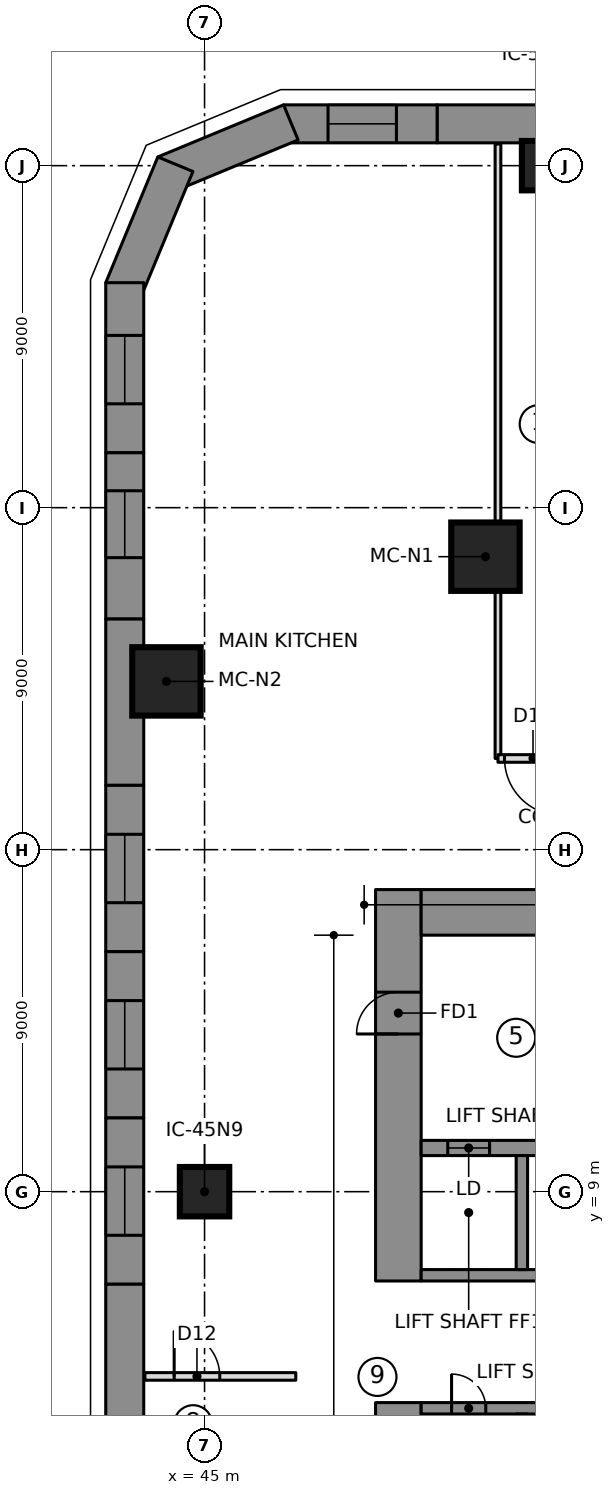
"""IFC4 building model, lengths in metres.
Left out: names, types, materials, properties, quantities, classifications, styles, units other than length and angle.
Written with IfcOpenShell. Run it as: python <this file> out.ifc"""

import sys

from ifc_helpers import new_model, si_unit, direction, frame, frame_2d, origin, origin_2d, place, context, subcontext, project, spatial, polyline, rectangle, outline, extrude, element, fill, save


model = new_model("IFC4")
c1 = context("Model", 3, precision=1e-05, world=origin(), true_north=direction((0.0, 1.0)))
c2 = subcontext(c1, "Body", "Model", "MODEL_VIEW")
j1 = project(units=[si_unit("LENGTHUNIT", "METRE"), si_unit("PLANEANGLEUNIT", "RADIAN")], contexts=[c1])
p1 = place(None, origin())
s1 = spatial("IfcSite", under=j1, at=p1, CompositionType="ELEMENT")
p2 = place(p1, origin())
s2 = spatial("IfcBuilding", under=s1, at=p2, CompositionType="ELEMENT")
p3 = place(p2, frame((0.0, 0.0, 13.5)))
s3 = spatial("IfcBuildingStorey", under=s2, at=p3, CompositionType="ELEMENT", Elevation=13.5)
p4 = place(p3, frame((50.1, 6.65, 0.0), z_axis=(0.0, 0.0, 1.0), x_axis=(0.0, 1.0, 0.0)))
e1 = element("IfcWall", 1, at=p4, inside=s3, PredefinedType="SHEAR", context=c2, shape_type="SweptSolid", body=[
    extrude(rectangle(XDim=10.3, YDim=1.2, at=frame_2d((5.15, 0.0))), origin(), (0.0, 0.0, 1.0), 5.5),
])
p5 = place(p4, frame((6.5, 0.0, 0.0)))
e2 = element("IfcOpeningElement", 2, at=p5, cuts=e1, PredefinedType="OPENING", context=c2, shape_type="SweptSolid", body=[
    extrude(rectangle(XDim=1.1, YDim=2.1, at=frame_2d((0.55, 1.05))), frame((0.0, 0.61, 0.0), z_axis=(0.0, -1.0, 0.0), x_axis=(1.0, 0.0, 0.0)), (0.0, 0.0, 1.0), 1.22),
])
p6 = place(p3, frame((50.1, -3.45, 0.0), z_axis=(0.0, 0.0, 1.0), x_axis=(0.0, 1.0, 0.0)))
e3 = element("IfcWall", 3, at=p6, inside=s3, PredefinedType="SHEAR", context=c2, shape_type="SweptSolid", body=[
    extrude(rectangle(XDim=6.9, YDim=1.2, at=frame_2d((3.45, 0.0))), origin(), (0.0, 0.0, 1.0), 5.5),
])
p7 = place(p3, frame((50.7, 16.35, 0.0), z_axis=(0.0, 0.0, 1.0), x_axis=(1.0, 0.0, 0.0)))
e4 = element("IfcWall", 4, at=p7, inside=s3, PredefinedType="SHEAR", context=c2, shape_type="SweptSolid", body=[
    extrude(rectangle(XDim=13.38, YDim=1.2, at=frame_2d((6.69, 0.0))), origin(), (0.0, 0.0, 1.0), 5.5),
])
p8 = place(p3, frame((50.7, 10.15, 0.0), z_axis=(0.0, 0.0, 1.0), x_axis=(1.0, 0.0, 0.0)))
e5 = element("IfcWall", 5, at=p8, inside=s3, PredefinedType="SHEAR", context=c2, shape_type="SweptSolid", body=[
    extrude(rectangle(XDim=12.18, YDim=0.4, at=frame_2d((6.09, 0.0))), origin(), (0.0, 0.0, 1.0), 5.5),
])
p9 = place(p8, frame((0.7, 0.0, 0.0)))
e6 = element("IfcOpeningElement", 6, at=p9, cuts=e5, PredefinedType="OPENING", context=c2, shape_type="SweptSolid", body=[
    extrude(rectangle(XDim=1.1, YDim=2.1, at=frame_2d((0.55, 1.05))), frame((0.0, 0.21, 0.0), z_axis=(0.0, -1.0, 0.0), x_axis=(1.0, 0.0, 0.0)), (0.0, 0.0, 1.0), 0.42),
])
p10 = place(p8, frame((3.5, 0.0, 0.0)))
e7 = element("IfcOpeningElement", 7, at=p10, cuts=e5, PredefinedType="OPENING", context=c2, shape_type="SweptSolid", body=[
    extrude(rectangle(XDim=1.1, YDim=2.1, at=frame_2d((0.55, 1.05))), frame((0.0, 0.21, 0.0), z_axis=(0.0, -1.0, 0.0), x_axis=(1.0, 0.0, 0.0)), (0.0, 0.0, 1.0), 0.42),
])
p11 = place(p3, frame((50.7, 3.3, 0.0), z_axis=(0.0, 0.0, 1.0), x_axis=(1.0, 0.0, 0.0)))
e8 = element("IfcWall", 8, at=p11, inside=s3, PredefinedType="SHEAR", context=c2, shape_type="SweptSolid", body=[
    extrude(rectangle(XDim=10.9, YDim=0.3, at=frame_2d((5.45, 0.0))), origin(), (0.0, 0.0, 1.0), 5.5),
])
p12 = place(p11, frame((0.8, 0.0, 0.0)))
e9 = element("IfcOpeningElement", 9, at=p12, cuts=e8, PredefinedType="OPENING", context=c2, shape_type="SweptSolid", body=[
    extrude(rectangle(XDim=0.9, YDim=2.1, at=frame_2d((0.45, 1.05))), frame((0.0, 0.16, 0.0), z_axis=(0.0, -1.0, 0.0), x_axis=(1.0, 0.0, 0.0)), (0.0, 0.0, 1.0), 0.32),
])
p13 = place(p11, frame((3.6, 0.0, 0.0)))
e10 = element("IfcOpeningElement", 10, at=p13, cuts=e8, PredefinedType="OPENING", context=c2, shape_type="SweptSolid", body=[
    extrude(rectangle(XDim=0.9, YDim=2.1, at=frame_2d((0.45, 1.05))), frame((0.0, 0.16, 0.0), z_axis=(0.0, -1.0, 0.0), x_axis=(1.0, 0.0, 0.0)), (0.0, 0.0, 1.0), 0.32),
])
p14 = place(p11, frame((6.4, 0.0, 0.0)))
e11 = element("IfcOpeningElement", 11, at=p14, cuts=e8, PredefinedType="OPENING", context=c2, shape_type="SweptSolid", body=[
    extrude(rectangle(XDim=0.9, YDim=2.1, at=frame_2d((0.45, 1.05))), frame((0.0, 0.16, 0.0), z_axis=(0.0, -1.0, 0.0), x_axis=(1.0, 0.0, 0.0)), (0.0, 0.0, 1.0), 0.32),
])
p15 = place(p11, frame((9.2, 0.0, 0.0)))
e12 = element("IfcOpeningElement", 12, at=p15, cuts=e8, PredefinedType="OPENING", context=c2, shape_type="SweptSolid", body=[
    extrude(rectangle(XDim=0.9, YDim=2.1, at=frame_2d((0.45, 1.05))), frame((0.0, 0.16, 0.0), z_axis=(0.0, -1.0, 0.0), x_axis=(1.0, 0.0, 0.0)), (0.0, 0.0, 1.0), 0.32),
])
p16 = place(p3, frame((50.7, 6.8, 0.0), z_axis=(0.0, 0.0, 1.0), x_axis=(1.0, 0.0, 0.0)))
e13 = element("IfcWall", 13, at=p16, inside=s3, PredefinedType="SHEAR", context=c2, shape_type="SweptSolid", body=[
    extrude(rectangle(XDim=10.9, YDim=0.3, at=frame_2d((5.45, 0.0))), origin(), (0.0, 0.0, 1.0), 5.5),
])
p17 = place(p16, frame((6.3, 0.0, 0.0)))
e14 = element("IfcOpeningElement", 14, at=p17, cuts=e13, PredefinedType="OPENING", context=c2, shape_type="SweptSolid", body=[
    extrude(rectangle(XDim=1.1, YDim=2.1, at=frame_2d((0.55, 1.05))), frame((0.0, 0.16, 0.0), z_axis=(0.0, -1.0, 0.0), x_axis=(1.0, 0.0, 0.0)), (0.0, 0.0, 1.0), 0.32),
])
p18 = place(p16, frame((9.1, 0.0, 0.0)))
e15 = element("IfcOpeningElement", 15, at=p18, cuts=e13, PredefinedType="OPENING", context=c2, shape_type="SweptSolid", body=[
    extrude(rectangle(XDim=1.1, YDim=2.1, at=frame_2d((0.55, 1.05))), frame((0.0, 0.16, 0.0), z_axis=(0.0, -1.0, 0.0), x_axis=(1.0, 0.0, 0.0)), (0.0, 0.0, 1.0), 0.32),
])
for number, where, z_axis, x_axis in (
    (16, (53.35, 0.15, 0.0), (0.0, 0.0, 1.0), (0.0, 1.0, 0.0)),
    (17, (53.35, 6.95, 0.0), (0.0, 0.0, 1.0), (0.0, 1.0, 0.0)),
):
    element("IfcWall", number, at=place(p3, frame(where, z_axis=z_axis, x_axis=x_axis)), inside=s3, PredefinedType="SHEAR", context=c2, shape_type="SweptSolid", body=[
        extrude(rectangle(XDim=3.0, YDim=0.3, at=frame_2d((1.5, 0.0))), origin(), (0.0, 0.0, 1.0), 5.5),
    ])
for number, where, z_axis, x_axis in (
    (18, (52.392, 25.71, 0.0), (0.0, 0.0, 1.0), (1.0, 0.0, 0.0)),
    (19, (43.998, 22.428, 0.0), (0.0, 0.0, 1.0), (1.0, 0.0, 0.0)),
):
    element("IfcColumn", number, at=place(p3, frame(where, z_axis=z_axis, x_axis=x_axis)), inside=s3, PredefinedType="COLUMN", context=c2, shape_type="SweptSolid", body=[
        extrude(rectangle(XDim=1.8, YDim=1.8, at=origin_2d()), origin(), (0.0, 0.0, 1.0), 5.5),
    ])
for number, where, z_axis, x_axis in (
    (20, (45.0, 9.0, 0.0), (0.0, 0.0, 1.0), (1.0, 0.0, 0.0)),
    (21, (54.0, 36.0, 0.0), (0.0, 0.0, 1.0), (1.0, 0.0, 0.0)),
):
    element("IfcColumn", number, at=place(p3, frame(where, z_axis=z_axis, x_axis=x_axis)), inside=s3, PredefinedType="COLUMN", context=c2, shape_type="SweptSolid", body=[
        extrude(rectangle(XDim=1.3, YDim=1.3, at=origin_2d()), origin(), (0.0, 0.0, 1.0), 5.5),
    ])
p19 = place(p3, frame((55.06, 37.1, 0.0), z_axis=(0.0, 0.0, 1.0), x_axis=(-1.0, 0.0, 0.0)))
e22 = element("IfcWall", 22, at=p19, inside=s3, PredefinedType="NOTDEFINED", context=c2, shape_type="SweptSolid", body=[
    extrude(outline(polyline([(0.0, -0.5), (3.94, -0.5), (3.94, 0.5), (0.0, 0.5), (0.0, -0.5)])), origin(), (0.0, 0.0, 1.0), 5.2),
])
p20 = place(p3, frame((51.119, 37.1, 0.0), z_axis=(0.0, 0.0, 1.0), x_axis=(-1.0, 0.0, 0.0)))
e23 = element("IfcWall", 23, at=p20, inside=s3, PredefinedType="NOTDEFINED", context=c2, shape_type="SweptSolid", body=[
    extrude(outline(polyline([(0.0, -0.5), (4.04, -0.5), (3.841, 0.5), (0.0, 0.5), (0.0, -0.5)])), origin(), (0.0, 0.0, 1.0), 5.2),
])
p21 = place(p20, frame((1.07, 0.0, 0.9)))
e24 = element("IfcOpeningElement", 24, at=p21, cuts=e23, PredefinedType="OPENING", context=c2, shape_type="SweptSolid", body=[
    extrude(rectangle(XDim=1.8, YDim=2.4, at=frame_2d((0.9, 1.2))), frame((0.0, 0.51, 0.0), z_axis=(0.0, -1.0, 0.0), x_axis=(1.0, 0.0, 0.0)), (0.0, 0.0, 1.0), 1.02),
])
p22 = place(p3, frame((47.179, 37.1, 0.0), z_axis=(0.0, 0.0, 1.0), x_axis=(-0.923862365102, -0.382724875529, 0.0)))
e25 = element("IfcWall", 25, at=p22, inside=s3, PredefinedType="NOTDEFINED", context=c2, shape_type="SweptSolid", body=[
    extrude(outline(polyline([(-0.1, -0.5), (3.482, -0.5), (3.068, 0.5), (0.1, 0.5), (-0.1, -0.5)])), origin(), (0.0, 0.0, 1.0), 5.2),
])
p23 = place(p3, frame((44.153, 35.847, 0.0), z_axis=(0.0, 0.0, 1.0), x_axis=(-0.382724875529, -0.923862365102, 0.0)))
e26 = element("IfcWall", 26, at=p23, inside=s3, PredefinedType="NOTDEFINED", context=c2, shape_type="SweptSolid", body=[
    extrude(outline(polyline([(-0.207, -0.5), (3.375, -0.5), (3.175, 0.5), (0.207, 0.5), (-0.207, -0.5)])), origin(), (0.0, 0.0, 1.0), 5.2),
])
p24 = place(p3, frame((42.9, 32.821, 0.0), z_axis=(0.0, 0.0, 1.0), x_axis=(0.0, -1.0, 0.0)))
e27 = element("IfcWall", 27, at=p24, inside=s3, PredefinedType="NOTDEFINED", context=c2, shape_type="SweptSolid", body=[
    extrude(outline(polyline([(-0.1, -0.5), (4.376, -0.5), (4.376, 0.5), (0.1, 0.5), (-0.1, -0.5)])), origin(), (0.0, 0.0, 1.0), 5.2),
])
p25 = place(p24, frame((1.288, 0.0, 0.9)))
e28 = element("IfcOpeningElement", 28, at=p25, cuts=e27, PredefinedType="OPENING", context=c2, shape_type="SweptSolid", body=[
    extrude(rectangle(XDim=1.8, YDim=2.4, at=frame_2d((0.9, 1.2))), frame((0.0, 0.51, 0.0), z_axis=(0.0, -1.0, 0.0), x_axis=(1.0, 0.0, 0.0)), (0.0, 0.0, 1.0), 1.02),
])
p26 = place(p3, frame((42.9, 28.445, 0.0), z_axis=(0.0, 0.0, 1.0), x_axis=(0.0, -1.0, 0.0)))
e29 = element("IfcWall", 29, at=p26, inside=s3, PredefinedType="NOTDEFINED", context=c2, shape_type="SweptSolid", body=[
    extrude(outline(polyline([(0.0, -0.5), (4.376, -0.5), (4.376, 0.5), (0.0, 0.5), (0.0, -0.5)])), origin(), (0.0, 0.0, 1.0), 5.2),
])
p27 = place(p26, frame((1.0, 0.0, 0.9)))
e30 = element("IfcOpeningElement", 30, at=p27, cuts=e29, PredefinedType="OPENING", context=c2, shape_type="SweptSolid", body=[
    extrude(rectangle(XDim=1.76, YDim=2.4, at=frame_2d((0.88, 1.2))), frame((0.0, 0.51, 0.0), z_axis=(0.0, -1.0, 0.0), x_axis=(1.0, 0.0, 0.0)), (0.0, 0.0, 1.0), 1.02),
])
p28 = place(p3, frame((42.9, 24.069, 0.0), z_axis=(0.0, 0.0, 1.0), x_axis=(0.0, -1.0, 0.0)))
e31 = element("IfcWall", 31, at=p28, inside=s3, PredefinedType="NOTDEFINED", context=c2, shape_type="SweptSolid", body=[
    extrude(outline(polyline([(0.0, -0.5), (4.376, -0.5), (4.376, 0.5), (0.0, 0.5), (0.0, -0.5)])), origin(), (0.0, 0.0, 1.0), 5.2),
])
p29 = place(p3, frame((42.9, 19.693, 0.0), z_axis=(0.0, 0.0, 1.0), x_axis=(0.0, -1.0, 0.0)))
e32 = element("IfcWall", 32, at=p29, inside=s3, PredefinedType="NOTDEFINED", context=c2, shape_type="SweptSolid", body=[
    extrude(outline(polyline([(0.0, -0.5), (4.376, -0.5), (4.376, 0.5), (0.0, 0.5), (0.0, -0.5)])), origin(), (0.0, 0.0, 1.0), 5.2),
])
p30 = place(p29, frame((1.288, 0.0, 0.9)))
e33 = element("IfcOpeningElement", 33, at=p30, cuts=e32, PredefinedType="OPENING", context=c2, shape_type="SweptSolid", body=[
    extrude(rectangle(XDim=1.8, YDim=2.4, at=frame_2d((0.9, 1.2))), frame((0.0, 0.51, 0.0), z_axis=(0.0, -1.0, 0.0), x_axis=(1.0, 0.0, 0.0)), (0.0, 0.0, 1.0), 1.02),
])
p31 = place(p3, frame((42.9, 15.316, 0.0), z_axis=(0.0, 0.0, 1.0), x_axis=(0.0, -1.0, 0.0)))
e34 = element("IfcWall", 34, at=p31, inside=s3, PredefinedType="NOTDEFINED", context=c2, shape_type="SweptSolid", body=[
    extrude(outline(polyline([(0.0, -0.5), (4.376, -0.5), (4.376, 0.5), (0.0, 0.5), (0.0, -0.5)])), origin(), (0.0, 0.0, 1.0), 5.2),
])
p32 = place(p31, frame((1.288, 0.0, 0.9)))
e35 = element("IfcOpeningElement", 35, at=p32, cuts=e34, PredefinedType="OPENING", context=c2, shape_type="SweptSolid", body=[
    extrude(rectangle(XDim=1.8, YDim=2.4, at=frame_2d((0.9, 1.2))), frame((0.0, 0.51, 0.0), z_axis=(0.0, -1.0, 0.0), x_axis=(1.0, 0.0, 0.0)), (0.0, 0.0, 1.0), 1.02),
])
p33 = place(p3, frame((42.9, 10.94, 0.0), z_axis=(0.0, 0.0, 1.0), x_axis=(0.0, -1.0, 0.0)))
e36 = element("IfcWall", 36, at=p33, inside=s3, PredefinedType="NOTDEFINED", context=c2, shape_type="SweptSolid", body=[
    extrude(outline(polyline([(0.0, -0.5), (4.376, -0.5), (4.376, 0.5), (0.0, 0.5), (0.0, -0.5)])), origin(), (0.0, 0.0, 1.0), 5.2),
])
p34 = place(p33, frame((1.288, 0.0, 0.9)))
e37 = element("IfcOpeningElement", 37, at=p34, cuts=e36, PredefinedType="OPENING", context=c2, shape_type="SweptSolid", body=[
    extrude(rectangle(XDim=1.8, YDim=2.4, at=frame_2d((0.9, 1.2))), frame((0.0, 0.51, 0.0), z_axis=(0.0, -1.0, 0.0), x_axis=(1.0, 0.0, 0.0)), (0.0, 0.0, 1.0), 1.02),
])
p35 = place(p3, frame((42.9, 6.564, 0.0), z_axis=(0.0, 0.0, 1.0), x_axis=(0.0, -1.0, 0.0)))
e38 = element("IfcWall", 38, at=p35, inside=s3, PredefinedType="NOTDEFINED", context=c2, shape_type="SweptSolid", body=[
    extrude(outline(polyline([(0.0, -0.5), (4.376, -0.5), (4.376, 0.5), (0.0, 0.5), (0.0, -0.5)])), origin(), (0.0, 0.0, 1.0), 5.2),
])
p36 = place(p3, frame((43.43, 4.139, 0.0), z_axis=(0.0, 0.0, 1.0), x_axis=(1.0, 0.0, 0.0)))
e39 = element("IfcWall", 39, at=p36, inside=s3, PredefinedType="PARTITIONING", context=c2, shape_type="SweptSolid", body=[
    extrude(rectangle(XDim=3.971, YDim=0.2, at=frame_2d((1.985, 0.0))), origin(), (0.0, 0.0, 1.0), 5.15),
])
p37 = place(p36, frame((0.771, 0.0, 0.0)))
e40 = element("IfcOpeningElement", 40, at=p37, cuts=e39, PredefinedType="OPENING", context=c2, shape_type="SweptSolid", body=[
    extrude(rectangle(XDim=1.2, YDim=2.1, at=frame_2d((0.6, 1.05))), frame((0.0, 0.11, 0.0), z_axis=(0.0, -1.0, 0.0), x_axis=(1.0, 0.0, 0.0)), (0.0, 0.0, 1.0), 0.22),
])
p38 = place(p3, frame((52.721, 20.4, 0.0), z_axis=(0.0, 0.0, 1.0), x_axis=(0.0, 1.0, 0.0)))
e41 = element("IfcWall", 41, at=p38, inside=s3, PredefinedType="PARTITIONING", context=c2, shape_type="SweptSolid", body=[
    extrude(rectangle(XDim=16.17, YDim=0.15, at=frame_2d((8.085, 0.0))), origin(), (0.0, 0.0, 1.0), 5.15),
])
p39 = place(p3, frame((54.865, 20.4, 0.0), z_axis=(0.0, 0.0, 1.0), x_axis=(-1.0, 0.0, 0.0)))
e42 = element("IfcWall", 42, at=p39, inside=s3, PredefinedType="PARTITIONING", context=c2, shape_type="SweptSolid", body=[
    extrude(rectangle(XDim=2.144, YDim=0.2, at=frame_2d((1.072, 0.0))), origin(), (0.0, 0.0, 1.0), 5.15),
])
p40 = place(p39, frame((0.472, 0.0, 0.0)))
e43 = element("IfcOpeningElement", 43, at=p40, cuts=e42, PredefinedType="OPENING", context=c2, shape_type="SweptSolid", body=[
    extrude(rectangle(XDim=1.5, YDim=2.1, at=frame_2d((0.75, 1.05))), frame((0.0, 0.11, 0.0), z_axis=(0.0, -1.0, 0.0), x_axis=(1.0, 0.0, 0.0)), (0.0, 0.0, 1.0), 0.22),
])
p41 = place(p21, origin())
e44 = element("IfcWindow", 44, at=p41, inside=s3, PartitioningType="SINGLE_PANEL", PredefinedType="WINDOW", context=c2, shape_type="SweptSolid", body=[
    extrude(rectangle(XDim=1.8, YDim=2.4, at=frame_2d((0.9, 1.2))), frame((0.0, 0.5, 0.0), z_axis=(0.0, -1.0, 0.0), x_axis=(1.0, 0.0, 0.0)), (0.0, 0.0, 1.0), 0.06),
])
fill(e24, e44)
p42 = place(p25, origin())
e45 = element("IfcWindow", 45, at=p42, inside=s3, PartitioningType="SINGLE_PANEL", PredefinedType="WINDOW", context=c2, shape_type="SweptSolid", body=[
    extrude(rectangle(XDim=1.8, YDim=2.4, at=frame_2d((0.9, 1.2))), frame((0.0, 0.5, 0.0), z_axis=(0.0, -1.0, 0.0), x_axis=(1.0, 0.0, 0.0)), (0.0, 0.0, 1.0), 0.06),
])
fill(e28, e45)
p43 = place(p27, origin())
e46 = element("IfcWindow", 46, at=p43, inside=s3, PartitioningType="SINGLE_PANEL", PredefinedType="WINDOW", context=c2, shape_type="SweptSolid", body=[
    extrude(rectangle(XDim=1.76, YDim=2.4, at=frame_2d((0.88, 1.2))), frame((0.0, 0.5, 0.0), z_axis=(0.0, -1.0, 0.0), x_axis=(1.0, 0.0, 0.0)), (0.0, 0.0, 1.0), 0.06),
])
fill(e30, e46)
p44 = place(p30, origin())
e47 = element("IfcWindow", 47, at=p44, inside=s3, PartitioningType="SINGLE_PANEL", PredefinedType="WINDOW", context=c2, shape_type="SweptSolid", body=[
    extrude(rectangle(XDim=1.8, YDim=2.4, at=frame_2d((0.9, 1.2))), frame((0.0, 0.5, 0.0), z_axis=(0.0, -1.0, 0.0), x_axis=(1.0, 0.0, 0.0)), (0.0, 0.0, 1.0), 0.06),
])
fill(e33, e47)
p45 = place(p32, origin())
e48 = element("IfcWindow", 48, at=p45, inside=s3, PartitioningType="SINGLE_PANEL", PredefinedType="WINDOW", context=c2, shape_type="SweptSolid", body=[
    extrude(rectangle(XDim=1.8, YDim=2.4, at=frame_2d((0.9, 1.2))), frame((0.0, 0.5, 0.0), z_axis=(0.0, -1.0, 0.0), x_axis=(1.0, 0.0, 0.0)), (0.0, 0.0, 1.0), 0.06),
])
fill(e35, e48)
p46 = place(p34, origin())
e49 = element("IfcWindow", 49, at=p46, inside=s3, PartitioningType="SINGLE_PANEL", PredefinedType="WINDOW", context=c2, shape_type="SweptSolid", body=[
    extrude(rectangle(XDim=1.8, YDim=2.4, at=frame_2d((0.9, 1.2))), frame((0.0, 0.5, 0.0), z_axis=(0.0, -1.0, 0.0), x_axis=(1.0, 0.0, 0.0)), (0.0, 0.0, 1.0), 0.06),
])
fill(e37, e49)
p47 = place(p37, origin())
e50 = element("IfcDoor", 50, at=p47, inside=s3, OperationType="SINGLE_SWING_RIGHT", PredefinedType="DOOR", context=c2, shape_type="SweptSolid", body=[
    extrude(rectangle(XDim=1.2, YDim=2.1, at=frame_2d((0.6, 1.05))), frame((0.0, 0.025, 0.0), z_axis=(0.0, -1.0, 0.0), x_axis=(1.0, 0.0, 0.0)), (0.0, 0.0, 1.0), 0.05),
])
fill(e40, e50)
p48 = place(p40, origin())
e51 = element("IfcDoor", 51, at=p48, inside=s3, OperationType="DOUBLE_DOOR_SINGLE_SWING", PredefinedType="DOOR", context=c2, shape_type="SweptSolid", body=[
    extrude(rectangle(XDim=1.5, YDim=2.1, at=frame_2d((0.75, 1.05))), frame((0.0, 0.025, 0.0), z_axis=(0.0, -1.0, 0.0), x_axis=(1.0, 0.0, 0.0)), (0.0, 0.0, 1.0), 0.05),
])
fill(e43, e51)
p49 = place(p9, origin())
e52 = element("IfcDoor", 52, at=p49, inside=s3, OperationType="DOUBLE_DOOR_SLIDING", PredefinedType="DOOR", context=c2, shape_type="SweptSolid", body=[
    extrude(rectangle(XDim=1.1, YDim=2.1, at=frame_2d((0.55, 1.05))), frame((0.0, 0.025, 0.0), z_axis=(0.0, -1.0, 0.0), x_axis=(1.0, 0.0, 0.0)), (0.0, 0.0, 1.0), 0.05),
])
fill(e6, e52)
p50 = place(p5, origin())
e53 = element("IfcDoor", 53, at=p50, inside=s3, OperationType="SINGLE_SWING_RIGHT", PredefinedType="DOOR", context=c2, shape_type="SweptSolid", body=[
    extrude(rectangle(XDim=1.1, YDim=2.1, at=frame_2d((0.55, 1.05))), frame((0.0, 0.025, 0.0), z_axis=(0.0, -1.0, 0.0), x_axis=(1.0, 0.0, 0.0)), (0.0, 0.0, 1.0), 0.05),
])
fill(e2, e53)
p51 = place(p12, origin())
e54 = element("IfcDoor", 54, at=p51, inside=s3, OperationType="SINGLE_SWING_LEFT", PredefinedType="DOOR", context=c2, shape_type="SweptSolid", body=[
    extrude(rectangle(XDim=0.9, YDim=2.1, at=frame_2d((0.45, 1.05))), frame((0.0, 0.025, 0.0), z_axis=(0.0, -1.0, 0.0), x_axis=(1.0, 0.0, 0.0)), (0.0, 0.0, 1.0), 0.05),
])
fill(e9, e54)
save(model, sys.argv[1])
